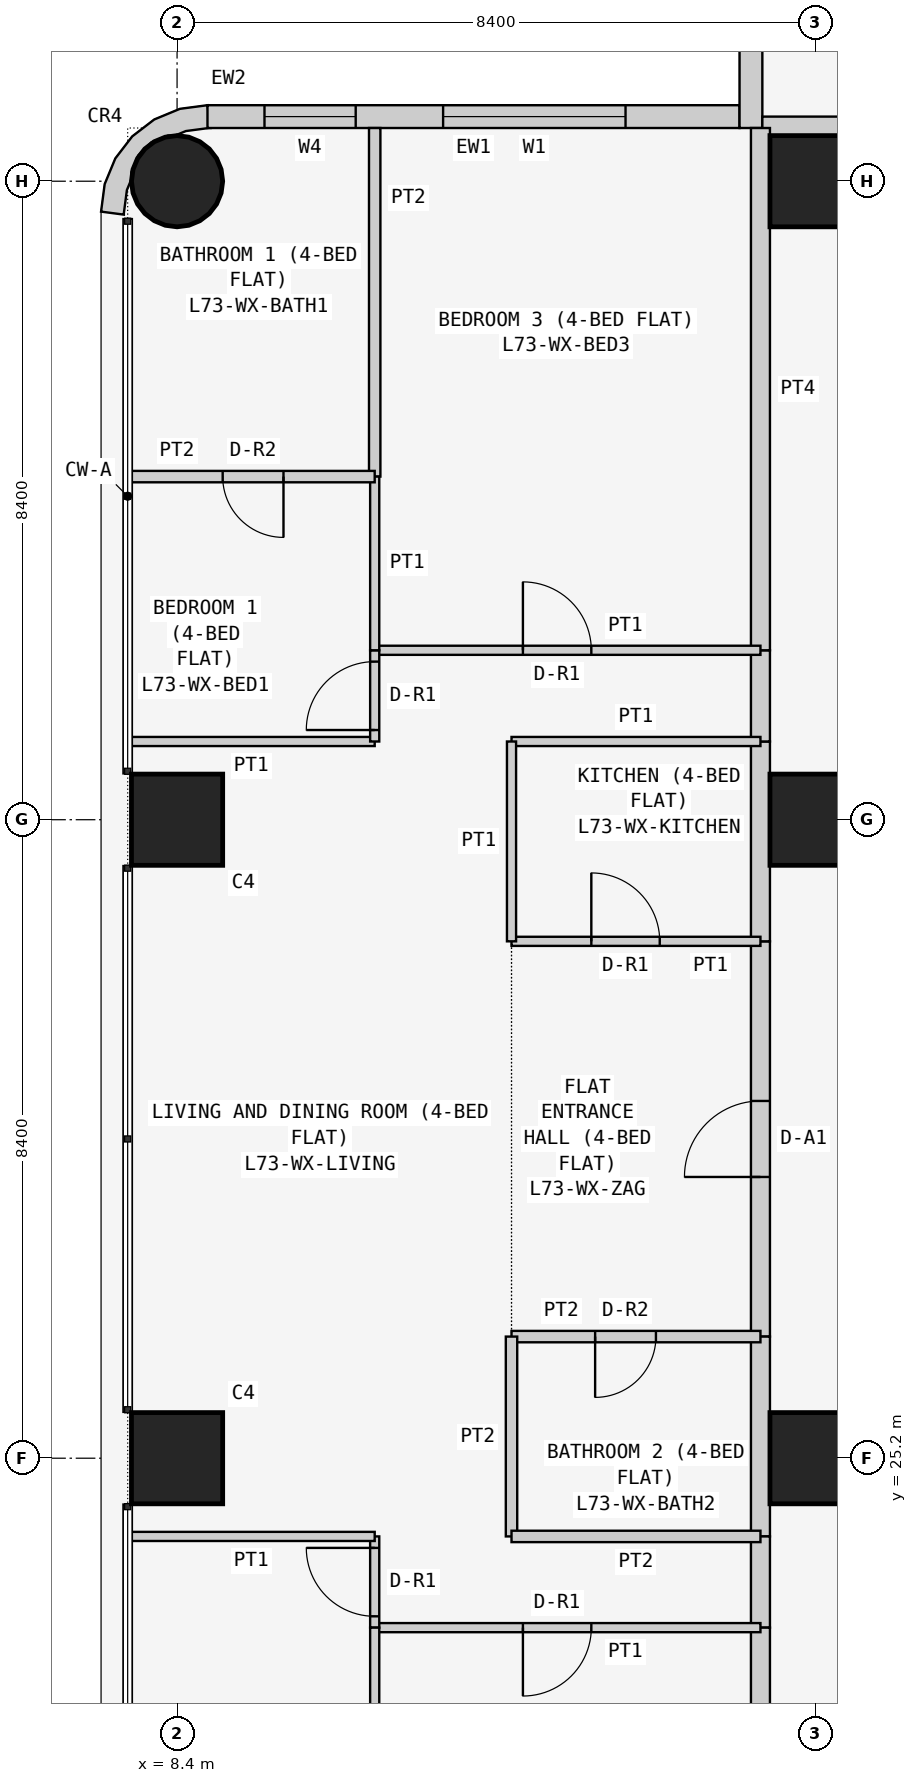
"""IFC4 building model, lengths in metres.
Left out: names, types, materials, properties, quantities, classifications, styles, units other than length and angle.
Written with IfcOpenShell. Run it as: python <this file> out.ifc"""

import sys

from ifc_helpers import new_model, si_unit, direction, frame, frame_2d, origin, origin_2d, place, context, subcontext, project, spatial, polyline, rectangle, circle, outline, extrude, element, fill, save


model = new_model("IFC4")
c1 = context("Model", 3, precision=1e-05, world=origin(), true_north=direction((0.0, 1.0)))
c2 = subcontext(c1, "Body", "Model", "MODEL_VIEW")
j1 = project(units=[si_unit("LENGTHUNIT", "METRE"), si_unit("PLANEANGLEUNIT", "RADIAN")], contexts=[c1])
p1 = place(None, origin())
s1 = spatial("IfcSite", under=j1, at=p1, CompositionType="ELEMENT")
p2 = place(p1, origin())
s2 = spatial("IfcBuilding", under=s1, at=p2, CompositionType="ELEMENT")
p3 = place(p2, frame((0.0, 0.0, 279.3)))
s3 = spatial("IfcBuildingStorey", under=s2, at=p3, CompositionType="ELEMENT", Elevation=279.3)
for number, where, z_axis, x_axis in (
    (1, (8.4, 25.2, 0.0), (0.0, 0.0, 1.0), (1.0, 0.0, 0.0)),
    (2, (8.4, 33.6, 0.0), (0.0, 0.0, 1.0), (1.0, 0.0, 0.0)),
):
    element("IfcColumn", number, at=place(p3, frame(where, z_axis=z_axis, x_axis=x_axis)), inside=s3, PredefinedType="COLUMN", context=c2, shape_type="SweptSolid", body=[
        extrude(rectangle(XDim=1.2, YDim=1.2, at=origin_2d()), origin(), (0.0, 0.0, 1.0), 3.6),
    ])
p4 = place(p3, frame((8.4, 42.0, 0.0), z_axis=(0.0, 0.0, 1.0), x_axis=(1.0, 0.0, 0.0)))
e3 = element("IfcColumn", 3, at=p4, inside=s3, PredefinedType="COLUMN", context=c2, shape_type="SweptSolid", body=[
    extrude(circle(Radius=0.6, at=origin_2d()), origin(), (0.0, 0.0, 1.0), 3.6),
])
for number, where, z_axis, x_axis in (
    (4, (16.8, 25.2, 0.0), (0.0, 0.0, 1.0), (1.0, 0.0, 0.0)),
    (5, (16.8, 33.6, 0.0), (0.0, 0.0, 1.0), (1.0, 0.0, 0.0)),
    (6, (16.8, 42.0, 0.0), (0.0, 0.0, 1.0), (1.0, 0.0, 0.0)),
):
    element("IfcColumn", number, at=place(p3, frame(where, z_axis=z_axis, x_axis=x_axis)), inside=s3, PredefinedType="COLUMN", context=c2, shape_type="SweptSolid", body=[
        extrude(rectangle(XDim=1.2, YDim=1.2, at=origin_2d()), origin(), (0.0, 0.0, 1.0), 3.6),
    ])
p5 = place(p3, frame((15.8, 42.85, 0.0), z_axis=(0.0, 0.0, 1.0), x_axis=(-1.0, 0.0, 0.0)))
e7 = element("IfcWall", 7, at=p5, inside=s3, PredefinedType="SOLIDWALL", context=c2, shape_type="SweptSolid", body=[
    extrude(rectangle(XDim=7.0, YDim=0.3, at=frame_2d((3.5, 0.0))), origin(), (0.0, 0.0, 1.0), 3.45),
])
p6 = place(p5, frame((1.5, 0.0, 0.9)))
e8 = element("IfcOpeningElement", 8, at=p6, cuts=e7, PredefinedType="OPENING", context=c2, shape_type="SweptSolid", body=[
    extrude(rectangle(XDim=2.4, YDim=1.5, at=frame_2d((1.2, 0.75))), frame((0.0, 0.16, 0.0), z_axis=(0.0, -1.0, 0.0), x_axis=(1.0, 0.0, 0.0)), (0.0, 0.0, 1.0), 0.32),
])
p7 = place(p5, frame((5.05, 0.0, 0.9)))
e9 = element("IfcOpeningElement", 9, at=p7, cuts=e7, PredefinedType="OPENING", context=c2, shape_type="SweptSolid", body=[
    extrude(rectangle(XDim=1.2, YDim=1.5, at=frame_2d((0.6, 0.75))), frame((0.0, 0.16, 0.0), z_axis=(0.0, -1.0, 0.0), x_axis=(1.0, 0.0, 0.0)), (0.0, 0.0, 1.0), 0.32),
])
p8 = place(p3, frame((15.95, 50.0, 0.0), z_axis=(0.0, 0.0, 1.0), x_axis=(0.0, -1.0, 0.0)))
e10 = element("IfcWall", 10, at=p8, inside=s3, PredefinedType="SOLIDWALL", context=c2, shape_type="SweptSolid", body=[
    extrude(rectangle(XDim=7.3, YDim=0.3, at=frame_2d((3.65, 0.0))), origin(), (0.0, 0.0, 1.0), 3.45),
])
p9 = place(p8, frame((3.1, 0.0, 0.9)))
e11 = element("IfcOpeningElement", 11, at=p9, cuts=e10, PredefinedType="OPENING", context=c2, shape_type="SweptSolid", body=[
    extrude(rectangle(XDim=2.4, YDim=1.5, at=frame_2d((1.2, 0.75))), frame((0.0, 0.16, 0.0), z_axis=(0.0, -1.0, 0.0), x_axis=(1.0, 0.0, 0.0)), (0.0, 0.0, 1.0), 0.32),
])
p10 = place(p8, frame((0.75, 0.0, 0.9)))
e12 = element("IfcOpeningElement", 12, at=p10, cuts=e10, PredefinedType="OPENING", context=c2, shape_type="SweptSolid", body=[
    extrude(rectangle(XDim=1.2, YDim=1.5, at=frame_2d((0.6, 0.75))), frame((0.0, 0.16, 0.0), z_axis=(0.0, -1.0, 0.0), x_axis=(1.0, 0.0, 0.0)), (0.0, 0.0, 1.0), 0.32),
])
p11 = place(p3, frame((8.762, 42.576, 0.0), z_axis=(0.0, 0.0, 1.0), x_axis=(-0.707106781187, 0.707106781187, 0.0)))
e13 = element("IfcWall", 13, at=p11, inside=s3, PredefinedType="SOLIDWALL", context=c2, shape_type="SweptSolid", body=[
    extrude(outline(polyline([(0.233, 0.114), (0.047, -0.129), (0.033, -0.143), (0.273, -0.327), (0.495, -0.037), (0.635, 0.3), (0.683, 0.663), (0.635, 1.025), (0.495, 1.363), (0.273, 1.653), (0.033, 1.469), (0.047, 1.455), (0.233, 1.212), (0.292, 1.069), (0.358, 1.003), (0.449, 0.783), (0.449, 0.543), (0.358, 0.322), (0.292, 0.257), (0.233, 0.114)])), origin(), (0.0, 0.0, 1.0), 3.45),
])
p12 = place(p3, frame((16.1, 42.725, 0.0), z_axis=(0.0, 0.0, 1.0), x_axis=(1.0, 0.0, 0.0)))
e14 = element("IfcWall", 14, at=p12, inside=s3, PredefinedType="PARTITIONING", context=c2, shape_type="SweptSolid", body=[
    extrude(rectangle(XDim=6.471, YDim=0.25, at=frame_2d((3.235, 0.0))), origin(), (0.0, 0.0, 1.0), 3.45),
])
p13 = place(p3, frame((16.075, 26.8, 0.0), z_axis=(0.0, 0.0, 1.0), x_axis=(0.0, 1.0, 0.0)))
e15 = element("IfcWall", 15, at=p13, inside=s3, PredefinedType="PARTITIONING", context=c2, shape_type="SweptSolid", body=[
    extrude(rectangle(XDim=5.2, YDim=0.25, at=frame_2d((2.6, 0.0))), origin(), (0.0, 0.0, 1.0), 3.45),
])
p14 = place(p13, frame((2.1, 0.0, 0.0)))
e16 = element("IfcOpeningElement", 16, at=p14, cuts=e15, PredefinedType="OPENING", context=c2, shape_type="SweptSolid", body=[
    extrude(rectangle(XDim=1.0, YDim=2.1, at=frame_2d((0.5, 1.05))), frame((0.0, 0.135, 0.0), z_axis=(0.0, -1.0, 0.0), x_axis=(1.0, 0.0, 0.0)), (0.0, 0.0, 1.0), 0.27),
])
p15 = place(p3, frame((16.075, 24.171, 0.0), z_axis=(0.0, 0.0, 1.0), x_axis=(0.0, 1.0, 0.0)))
e17 = element("IfcWall", 17, at=p15, inside=s3, PredefinedType="PARTITIONING", context=c2, shape_type="SweptSolid", body=[
    extrude(rectangle(XDim=2.629, YDim=0.25, at=frame_2d((1.314, 0.0))), origin(), (0.0, 0.0, 1.0), 3.45),
])
p16 = place(p3, frame((16.075, 32.0, 0.0), z_axis=(0.0, 0.0, 1.0), x_axis=(0.0, 1.0, 0.0)))
e18 = element("IfcWall", 18, at=p16, inside=s3, PredefinedType="PARTITIONING", context=c2, shape_type="SweptSolid", body=[
    extrude(rectangle(XDim=2.629, YDim=0.25, at=frame_2d((1.314, 0.0))), origin(), (0.0, 0.0, 1.0), 3.45),
])
p17 = place(p3, frame((16.075, 22.971, 0.0), z_axis=(0.0, 0.0, 1.0), x_axis=(0.0, 1.0, 0.0)))
e19 = element("IfcWall", 19, at=p17, inside=s3, PredefinedType="PARTITIONING", context=c2, shape_type="SweptSolid", body=[
    extrude(rectangle(XDim=1.2, YDim=0.25, at=frame_2d((0.6, 0.0))), origin(), (0.0, 0.0, 1.0), 3.45),
])
p18 = place(p3, frame((16.075, 34.629, 0.0), z_axis=(0.0, 0.0, 1.0), x_axis=(0.0, 1.0, 0.0)))
e20 = element("IfcWall", 20, at=p18, inside=s3, PredefinedType="PARTITIONING", context=c2, shape_type="SweptSolid", body=[
    extrude(rectangle(XDim=1.2, YDim=0.25, at=frame_2d((0.6, 0.0))), origin(), (0.0, 0.0, 1.0), 3.45),
])
for number, where, z_axis, x_axis in (
    (21, (16.075, 16.1, 0.0), (0.0, 0.0, 1.0), (0.0, 1.0, 0.0)),
    (22, (16.075, 35.829, 0.0), (0.0, 0.0, 1.0), (0.0, 1.0, 0.0)),
):
    element("IfcWall", number, at=place(p3, frame(where, z_axis=z_axis, x_axis=x_axis)), inside=s3, PredefinedType="PARTITIONING", context=c2, shape_type="SweptSolid", body=[
        extrude(rectangle(XDim=6.871, YDim=0.25, at=frame_2d((3.436, 0.0))), origin(), (0.0, 0.0, 1.0), 3.45),
    ])
p19 = place(p3, frame((12.8, 26.8, 0.0), z_axis=(0.0, 0.0, 1.0), x_axis=(1.0, 0.0, 0.0)))
e23 = element("IfcWall", 23, at=p19, inside=s3, PredefinedType="PARTITIONING", context=c2, shape_type="SweptSolid", body=[
    extrude(rectangle(XDim=3.275, YDim=0.15, at=frame_2d((1.637, 0.0))), origin(), (0.0, 0.0, 1.0), 3.45),
])
p20 = place(p19, frame((1.1, 0.0, 0.0)))
e24 = element("IfcOpeningElement", 24, at=p20, cuts=e23, PredefinedType="OPENING", context=c2, shape_type="SweptSolid", body=[
    extrude(rectangle(XDim=0.8, YDim=2.1, at=frame_2d((0.4, 1.05))), frame((0.0, 0.085, 0.0), z_axis=(0.0, -1.0, 0.0), x_axis=(1.0, 0.0, 0.0)), (0.0, 0.0, 1.0), 0.17),
])
p21 = place(p3, frame((16.075, 32.0, 0.0), z_axis=(0.0, 0.0, 1.0), x_axis=(-1.0, 0.0, 0.0)))
e25 = element("IfcWall", 25, at=p21, inside=s3, PredefinedType="PARTITIONING", context=c2, shape_type="SweptSolid", body=[
    extrude(rectangle(XDim=3.275, YDim=0.12, at=frame_2d((1.637, 0.0))), origin(), (0.0, 0.0, 1.0), 3.45),
])
p22 = place(p21, frame((1.325, 0.0, 0.0)))
e26 = element("IfcOpeningElement", 26, at=p22, cuts=e25, PredefinedType="OPENING", context=c2, shape_type="SweptSolid", body=[
    extrude(rectangle(XDim=0.9, YDim=2.1, at=frame_2d((0.45, 1.05))), frame((0.0, 0.07, 0.0), z_axis=(0.0, -1.0, 0.0), x_axis=(1.0, 0.0, 0.0)), (0.0, 0.0, 1.0), 0.14),
])
p23 = place(p3, frame((12.8, 26.8, 0.0), z_axis=(0.0, 0.0, 1.0), x_axis=(0.0, -1.0, 0.0)))
e27 = element("IfcWall", 27, at=p23, inside=s3, PredefinedType="PARTITIONING", context=c2, shape_type="SweptSolid", body=[
    extrude(rectangle(XDim=2.629, YDim=0.15, at=frame_2d((1.314, 0.0))), origin(), (0.0, 0.0, 1.0), 3.45),
])
p24 = place(p3, frame((12.8, 24.171, 0.0), z_axis=(0.0, 0.0, 1.0), x_axis=(1.0, 0.0, 0.0)))
e28 = element("IfcWall", 28, at=p24, inside=s3, PredefinedType="PARTITIONING", context=c2, shape_type="SweptSolid", body=[
    extrude(rectangle(XDim=3.275, YDim=0.15, at=frame_2d((1.637, 0.0))), origin(), (0.0, 0.0, 1.0), 3.45),
])
p25 = place(p3, frame((16.075, 34.629, 0.0), z_axis=(0.0, 0.0, 1.0), x_axis=(-1.0, 0.0, 0.0)))
e29 = element("IfcWall", 29, at=p25, inside=s3, PredefinedType="PARTITIONING", context=c2, shape_type="SweptSolid", body=[
    extrude(rectangle(XDim=3.275, YDim=0.12, at=frame_2d((1.637, 0.0))), origin(), (0.0, 0.0, 1.0), 3.45),
])
p26 = place(p3, frame((12.8, 34.629, 0.0), z_axis=(0.0, 0.0, 1.0), x_axis=(0.0, -1.0, 0.0)))
e30 = element("IfcWall", 30, at=p26, inside=s3, PredefinedType="PARTITIONING", context=c2, shape_type="SweptSolid", body=[
    extrude(rectangle(XDim=2.629, YDim=0.12, at=frame_2d((1.314, 0.0))), origin(), (0.0, 0.0, 1.0), 3.45),
])
p27 = place(p3, frame((16.075, 22.971, 0.0), z_axis=(0.0, 0.0, 1.0), x_axis=(-1.0, 0.0, 0.0)))
e31 = element("IfcWall", 31, at=p27, inside=s3, PredefinedType="PARTITIONING", context=c2, shape_type="SweptSolid", body=[
    extrude(rectangle(XDim=5.075, YDim=0.12, at=frame_2d((2.538, 0.0))), origin(), (0.0, 0.0, 1.0), 3.45),
])
p28 = place(p27, frame((2.225, 0.0, 0.0)))
e32 = element("IfcOpeningElement", 32, at=p28, cuts=e31, PredefinedType="OPENING", context=c2, shape_type="SweptSolid", body=[
    extrude(rectangle(XDim=0.9, YDim=2.1, at=frame_2d((0.45, 1.05))), frame((0.0, 0.07, 0.0), z_axis=(0.0, -1.0, 0.0), x_axis=(1.0, 0.0, 0.0)), (0.0, 0.0, 1.0), 0.14),
])
p29 = place(p3, frame((11.0, 22.971, 0.0), z_axis=(0.0, 0.0, 1.0), x_axis=(0.0, 1.0, 0.0)))
e33 = element("IfcWall", 33, at=p29, inside=s3, PredefinedType="PARTITIONING", context=c2, shape_type="SweptSolid", body=[
    extrude(rectangle(XDim=1.2, YDim=0.12, at=frame_2d((0.6, 0.0))), origin(), (0.0, 0.0, 1.0), 3.45),
])
p30 = place(p29, frame((0.149, 0.0, 0.0)))
e34 = element("IfcOpeningElement", 34, at=p30, cuts=e33, PredefinedType="OPENING", context=c2, shape_type="SweptSolid", body=[
    extrude(rectangle(XDim=0.9, YDim=2.1, at=frame_2d((0.45, 1.05))), frame((0.0, 0.07, 0.0), z_axis=(0.0, -1.0, 0.0), x_axis=(1.0, 0.0, 0.0)), (0.0, 0.0, 1.0), 0.14),
])
p31 = place(p3, frame((11.0, 24.171, 0.0), z_axis=(0.0, 0.0, 1.0), x_axis=(-1.0, 0.0, 0.0)))
e35 = element("IfcWall", 35, at=p31, inside=s3, PredefinedType="PARTITIONING", context=c2, shape_type="SweptSolid", body=[
    extrude(rectangle(XDim=3.25, YDim=0.12, at=frame_2d((1.625, 0.0))), origin(), (0.0, 0.0, 1.0), 3.45),
])
p32 = place(p3, frame((11.0, 35.829, 0.0), z_axis=(0.0, 0.0, 1.0), x_axis=(1.0, 0.0, 0.0)))
e36 = element("IfcWall", 36, at=p32, inside=s3, PredefinedType="PARTITIONING", context=c2, shape_type="SweptSolid", body=[
    extrude(rectangle(XDim=5.075, YDim=0.12, at=frame_2d((2.538, 0.0))), origin(), (0.0, 0.0, 1.0), 3.45),
])
p33 = place(p32, frame((1.95, 0.0, 0.0)))
e37 = element("IfcOpeningElement", 37, at=p33, cuts=e36, PredefinedType="OPENING", context=c2, shape_type="SweptSolid", body=[
    extrude(rectangle(XDim=0.9, YDim=2.1, at=frame_2d((0.45, 1.05))), frame((0.0, 0.07, 0.0), z_axis=(0.0, -1.0, 0.0), x_axis=(1.0, 0.0, 0.0)), (0.0, 0.0, 1.0), 0.14),
])
p34 = place(p3, frame((7.75, 34.629, 0.0), z_axis=(0.0, 0.0, 1.0), x_axis=(1.0, 0.0, 0.0)))
e38 = element("IfcWall", 38, at=p34, inside=s3, PredefinedType="PARTITIONING", context=c2, shape_type="SweptSolid", body=[
    extrude(rectangle(XDim=3.25, YDim=0.12, at=frame_2d((1.625, 0.0))), origin(), (0.0, 0.0, 1.0), 3.45),
])
p35 = place(p3, frame((11.0, 34.629, 0.0), z_axis=(0.0, 0.0, 1.0), x_axis=(0.0, 1.0, 0.0)))
e39 = element("IfcWall", 39, at=p35, inside=s3, PredefinedType="PARTITIONING", context=c2, shape_type="SweptSolid", body=[
    extrude(rectangle(XDim=1.2, YDim=0.12, at=frame_2d((0.6, 0.0))), origin(), (0.0, 0.0, 1.0), 3.45),
])
p36 = place(p35, frame((0.151, 0.0, 0.0)))
e40 = element("IfcOpeningElement", 40, at=p36, cuts=e39, PredefinedType="OPENING", context=c2, shape_type="SweptSolid", body=[
    extrude(rectangle(XDim=0.9, YDim=2.1, at=frame_2d((0.45, 1.05))), frame((0.0, 0.07, 0.0), z_axis=(0.0, -1.0, 0.0), x_axis=(1.0, 0.0, 0.0)), (0.0, 0.0, 1.0), 0.14),
])
p37 = place(p3, frame((11.0, 22.971, 0.0), z_axis=(0.0, 0.0, 1.0), x_axis=(0.0, -1.0, 0.0)))
e41 = element("IfcWall", 41, at=p37, inside=s3, PredefinedType="PARTITIONING", context=c2, shape_type="SweptSolid", body=[
    extrude(rectangle(XDim=6.871, YDim=0.12, at=frame_2d((3.436, 0.0))), origin(), (0.0, 0.0, 1.0), 3.45),
])
p38 = place(p3, frame((11.0, 42.7, 0.0), z_axis=(0.0, 0.0, 1.0), x_axis=(0.0, -1.0, 0.0)))
e42 = element("IfcWall", 42, at=p38, inside=s3, PredefinedType="PARTITIONING", context=c2, shape_type="SweptSolid", body=[
    extrude(rectangle(XDim=4.586, YDim=0.15, at=frame_2d((2.293, 0.0))), origin(), (0.0, 0.0, 1.0), 3.45),
])
p39 = place(p3, frame((11.0, 38.114, 0.0), z_axis=(0.0, 0.0, 1.0), x_axis=(0.0, -1.0, 0.0)))
e43 = element("IfcWall", 43, at=p39, inside=s3, PredefinedType="PARTITIONING", context=c2, shape_type="SweptSolid", body=[
    extrude(rectangle(XDim=2.285, YDim=0.12, at=frame_2d((1.143, 0.0))), origin(), (0.0, 0.0, 1.0), 3.45),
])
p40 = place(p3, frame((7.75, 38.114, 0.0), z_axis=(0.0, 0.0, 1.0), x_axis=(1.0, 0.0, 0.0)))
e44 = element("IfcWall", 44, at=p40, inside=s3, PredefinedType="PARTITIONING", context=c2, shape_type="SweptSolid", body=[
    extrude(rectangle(XDim=3.25, YDim=0.15, at=frame_2d((1.625, 0.0))), origin(), (0.0, 0.0, 1.0), 3.45),
])
p41 = place(p40, frame((1.25, 0.0, 0.0)))
e45 = element("IfcOpeningElement", 45, at=p41, cuts=e44, PredefinedType="OPENING", context=c2, shape_type="SweptSolid", body=[
    extrude(rectangle(XDim=0.8, YDim=2.1, at=frame_2d((0.4, 1.05))), frame((0.0, 0.085, 0.0), z_axis=(0.0, -1.0, 0.0), x_axis=(1.0, 0.0, 0.0)), (0.0, 0.0, 1.0), 0.17),
])
p42 = place(p6, origin())
e46 = element("IfcWindow", 46, at=p42, inside=s3, PartitioningType="SINGLE_PANEL", PredefinedType="WINDOW", context=c2, shape_type="SweptSolid", body=[
    extrude(rectangle(XDim=2.4, YDim=1.5, at=frame_2d((1.2, 0.75))), frame((0.0, 0.03, 0.0), z_axis=(0.0, -1.0, 0.0), x_axis=(1.0, 0.0, 0.0)), (0.0, 0.0, 1.0), 0.06),
])
fill(e8, e46)
p43 = place(p7, origin())
e47 = element("IfcWindow", 47, at=p43, inside=s3, PartitioningType="SINGLE_PANEL", PredefinedType="WINDOW", context=c2, shape_type="SweptSolid", body=[
    extrude(rectangle(XDim=1.2, YDim=1.5, at=frame_2d((0.6, 0.75))), frame((0.0, 0.03, 0.0), z_axis=(0.0, -1.0, 0.0), x_axis=(1.0, 0.0, 0.0)), (0.0, 0.0, 1.0), 0.06),
])
fill(e9, e47)
p44 = place(p14, origin())
e48 = element("IfcDoor", 48, at=p44, inside=s3, OperationType="SINGLE_SWING_LEFT", PredefinedType="DOOR", context=c2, shape_type="SweptSolid", body=[
    extrude(rectangle(XDim=1.0, YDim=2.1, at=frame_2d((0.5, 1.05))), frame((0.0, 0.025, 0.0), z_axis=(0.0, -1.0, 0.0), x_axis=(1.0, 0.0, 0.0)), (0.0, 0.0, 1.0), 0.05),
])
fill(e16, e48)
p45 = place(p20, frame((0.8, 0.0, 0.0), z_axis=(0.0, 0.0, 1.0), x_axis=(-1.0, 0.0, 0.0)))
e49 = element("IfcDoor", 49, at=p45, inside=s3, OperationType="SINGLE_SWING_RIGHT", PredefinedType="DOOR", context=c2, shape_type="SweptSolid", body=[
    extrude(rectangle(XDim=0.8, YDim=2.1, at=frame_2d((0.4, 1.05))), frame((0.0, 0.025, 0.0), z_axis=(0.0, -1.0, 0.0), x_axis=(1.0, 0.0, 0.0)), (0.0, 0.0, 1.0), 0.05),
])
fill(e24, e49)
p46 = place(p22, frame((0.9, 0.0, 0.0), z_axis=(0.0, 0.0, 1.0), x_axis=(-1.0, 0.0, 0.0)))
e50 = element("IfcDoor", 50, at=p46, inside=s3, OperationType="SINGLE_SWING_LEFT", PredefinedType="DOOR", context=c2, shape_type="SweptSolid", body=[
    extrude(rectangle(XDim=0.9, YDim=2.1, at=frame_2d((0.45, 1.05))), frame((0.0, 0.025, 0.0), z_axis=(0.0, -1.0, 0.0), x_axis=(1.0, 0.0, 0.0)), (0.0, 0.0, 1.0), 0.05),
])
fill(e26, e50)
p47 = place(p28, origin())
e51 = element("IfcDoor", 51, at=p47, inside=s3, OperationType="SINGLE_SWING_RIGHT", PredefinedType="DOOR", context=c2, shape_type="SweptSolid", body=[
    extrude(rectangle(XDim=0.9, YDim=2.1, at=frame_2d((0.45, 1.05))), frame((0.0, 0.025, 0.0), z_axis=(0.0, -1.0, 0.0), x_axis=(1.0, 0.0, 0.0)), (0.0, 0.0, 1.0), 0.05),
])
fill(e32, e51)
p48 = place(p30, origin())
e52 = element("IfcDoor", 52, at=p48, inside=s3, OperationType="SINGLE_SWING_RIGHT", PredefinedType="DOOR", context=c2, shape_type="SweptSolid", body=[
    extrude(rectangle(XDim=0.9, YDim=2.1, at=frame_2d((0.45, 1.05))), frame((0.0, 0.025, 0.0), z_axis=(0.0, -1.0, 0.0), x_axis=(1.0, 0.0, 0.0)), (0.0, 0.0, 1.0), 0.05),
])
fill(e34, e52)
p49 = place(p33, origin())
e53 = element("IfcDoor", 53, at=p49, inside=s3, OperationType="SINGLE_SWING_LEFT", PredefinedType="DOOR", context=c2, shape_type="SweptSolid", body=[
    extrude(rectangle(XDim=0.9, YDim=2.1, at=frame_2d((0.45, 1.05))), frame((0.0, 0.025, 0.0), z_axis=(0.0, -1.0, 0.0), x_axis=(1.0, 0.0, 0.0)), (0.0, 0.0, 1.0), 0.05),
])
fill(e37, e53)
p50 = place(p36, origin())
e54 = element("IfcDoor", 54, at=p50, inside=s3, OperationType="SINGLE_SWING_LEFT", PredefinedType="DOOR", context=c2, shape_type="SweptSolid", body=[
    extrude(rectangle(XDim=0.9, YDim=2.1, at=frame_2d((0.45, 1.05))), frame((0.0, 0.025, 0.0), z_axis=(0.0, -1.0, 0.0), x_axis=(1.0, 0.0, 0.0)), (0.0, 0.0, 1.0), 0.05),
])
fill(e40, e54)
p51 = place(p41, frame((0.8, 0.0, 0.0), z_axis=(0.0, 0.0, 1.0), x_axis=(-1.0, 0.0, 0.0)))
e55 = element("IfcDoor", 55, at=p51, inside=s3, OperationType="SINGLE_SWING_LEFT", PredefinedType="DOOR", context=c2, shape_type="SweptSolid", body=[
    extrude(rectangle(XDim=0.8, YDim=2.1, at=frame_2d((0.4, 1.05))), frame((0.0, 0.025, 0.0), z_axis=(0.0, -1.0, 0.0), x_axis=(1.0, 0.0, 0.0)), (0.0, 0.0, 1.0), 0.05),
])
fill(e45, e55)
save(model, sys.argv[1])
